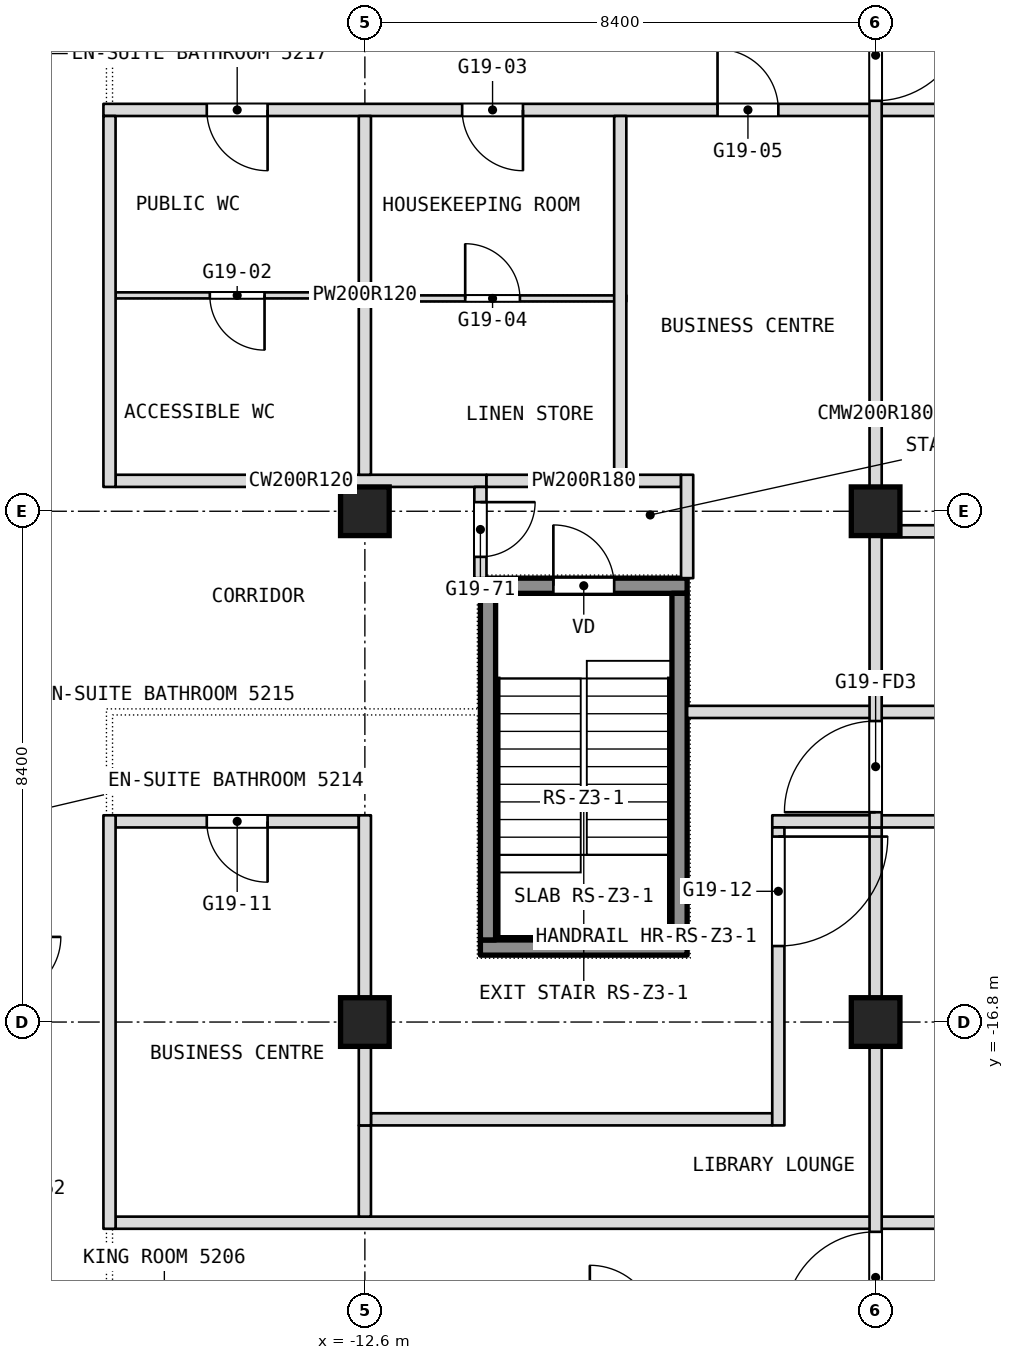
"""IFC4 building model, lengths in metres.
Left out: names, types, materials, properties, quantities, classifications, styles, units other than length and angle.
Written with IfcOpenShell. Run it as: python <this file> out.ifc"""

import sys

from ifc_helpers import new_model, si_unit, direction, frame, frame_2d, origin, origin_2d, place, context, subcontext, project, spatial, rectangle, extrude, element, fill, save


model = new_model("IFC4")
c1 = context("Model", 3, precision=1e-05, world=origin(), true_north=direction((0.0, 1.0)))
c2 = subcontext(c1, "Body", "Model", "MODEL_VIEW")
j1 = project(units=[si_unit("LENGTHUNIT", "METRE"), si_unit("PLANEANGLEUNIT", "RADIAN")], contexts=[c1])
p1 = place(None, origin())
s1 = spatial("IfcSite", under=j1, at=p1, CompositionType="ELEMENT")
p2 = place(p1, origin())
s2 = spatial("IfcBuilding", under=s1, at=p2, CompositionType="ELEMENT")
p3 = place(p2, frame((0.0, 0.0, 223.7)))
s3 = spatial("IfcBuildingStorey", under=s2, at=p3, CompositionType="ELEMENT", Elevation=223.7)
for number, where, z_axis, x_axis in (
    (1, (-12.6, -16.8, 0.0), (0.0, 0.0, 1.0), (1.0, 0.0, 0.0)),
    (2, (-12.6, -8.4, 0.0), (0.0, 0.0, 1.0), (1.0, 0.0, 0.0)),
    (3, (-4.2, -16.8, 0.0), (0.0, 0.0, 1.0), (1.0, 0.0, 0.0)),
    (4, (-4.2, -8.4, 0.0), (0.0, 0.0, 1.0), (1.0, 0.0, 0.0)),
):
    element("IfcColumn", number, at=place(p3, frame(where, z_axis=z_axis, x_axis=x_axis)), inside=s3, PredefinedType="COLUMN", context=c2, shape_type="SweptSolid", body=[
        extrude(rectangle(XDim=0.8, YDim=0.8, at=origin_2d()), origin(), (0.0, 0.0, 1.0), 3.6),
    ])
p4 = place(p3, frame((-16.7, -20.1, 0.0), z_axis=(0.0, 0.0, 1.0), x_axis=(1.0, 0.0, 0.0)))
e5 = element("IfcWall", 5, at=p4, inside=s3, PredefinedType="PARTITIONING", context=c2, shape_type="SweptSolid", body=[
    extrude(rectangle(XDim=33.4, YDim=0.2, at=frame_2d((16.7, 0.0))), origin(), (0.0, 0.0, 1.0), 3.34),
])
p5 = place(p3, frame((-12.5, -18.4, 0.0), z_axis=(0.0, 0.0, 1.0), x_axis=(1.0, 0.0, 0.0)))
e6 = element("IfcWall", 6, at=p5, inside=s3, PredefinedType="PARTITIONING", context=c2, shape_type="SweptSolid", body=[
    extrude(rectangle(XDim=6.6, YDim=0.2, at=frame_2d((3.3, 0.0))), origin(), (0.0, 0.0, 1.0), 3.34),
])
p6 = place(p3, frame((-16.7, -13.5, 0.0), z_axis=(0.0, 0.0, 1.0), x_axis=(1.0, 0.0, 0.0)))
e7 = element("IfcWall", 7, at=p6, inside=s3, PredefinedType="PARTITIONING", context=c2, shape_type="SweptSolid", body=[
    extrude(rectangle(XDim=4.0, YDim=0.2, at=frame_2d((2.0, 0.0))), origin(), (0.0, 0.0, 1.0), 3.34),
])
p7 = place(p6, frame((1.5, 0.0, 0.0)))
e8 = element("IfcOpeningElement", 8, at=p7, cuts=e7, PredefinedType="OPENING", context=c2, shape_type="SweptSolid", body=[
    extrude(rectangle(XDim=1.0, YDim=2.1, at=frame_2d((0.5, 1.05))), frame((0.0, 0.1, 0.0), z_axis=(0.0, -1.0, 0.0), x_axis=(1.0, 0.0, 0.0)), (0.0, 0.0, 1.0), 0.2),
])
p8 = place(p3, frame((-5.9, -13.5, 0.0), z_axis=(0.0, 0.0, 1.0), x_axis=(1.0, 0.0, 0.0)))
e9 = element("IfcWall", 9, at=p8, inside=s3, PredefinedType="PARTITIONING", context=c2, shape_type="SweptSolid", body=[
    extrude(rectangle(XDim=11.6, YDim=0.2, at=frame_2d((5.8, 0.0))), origin(), (0.0, 0.0, 1.0), 3.34),
])
p9 = place(p8, frame((3.3, 0.0, 0.0)))
e10 = element("IfcOpeningElement", 10, at=p9, cuts=e9, PredefinedType="OPENING", context=c2, shape_type="SweptSolid", body=[
    extrude(rectangle(XDim=1.0, YDim=2.1, at=frame_2d((0.5, 1.05))), frame((0.0, 0.1, 0.0), z_axis=(0.0, -1.0, 0.0), x_axis=(1.0, 0.0, 0.0)), (0.0, 0.0, 1.0), 0.2),
])
p10 = place(p8, frame((7.5, 0.0, 0.0)))
e11 = element("IfcOpeningElement", 11, at=p10, cuts=e9, PredefinedType="OPENING", context=c2, shape_type="SweptSolid", body=[
    extrude(rectangle(XDim=1.0, YDim=2.1, at=frame_2d((0.5, 1.05))), frame((0.0, 0.1, 0.0), z_axis=(0.0, -1.0, 0.0), x_axis=(1.0, 0.0, 0.0)), (0.0, 0.0, 1.0), 0.2),
])
p11 = place(p3, frame((-7.3, -11.7, 0.0), z_axis=(0.0, 0.0, 1.0), x_axis=(1.0, 0.0, 0.0)))
e12 = element("IfcWall", 12, at=p11, inside=s3, PredefinedType="PARTITIONING", context=c2, shape_type="SweptSolid", body=[
    extrude(rectangle(XDim=14.6, YDim=0.2, at=frame_2d((7.3, 0.0))), origin(), (0.0, 0.0, 1.0), 3.34),
])
p12 = place(p11, frame((6.8, 0.0, 0.0)))
e13 = element("IfcOpeningElement", 13, at=p12, cuts=e12, PredefinedType="OPENING", context=c2, shape_type="SweptSolid", body=[
    extrude(rectangle(XDim=1.0, YDim=2.1, at=frame_2d((0.5, 1.05))), frame((0.0, 0.1, 0.0), z_axis=(0.0, -1.0, 0.0), x_axis=(1.0, 0.0, 0.0)), (0.0, 0.0, 1.0), 0.2),
])
p13 = place(p3, frame((-4.1, -8.73, 0.0), z_axis=(0.0, 0.0, 1.0), x_axis=(1.0, 0.0, 0.0)))
e14 = element("IfcWall", 14, at=p13, inside=s3, PredefinedType="PARTITIONING", context=c2, shape_type="SweptSolid", body=[
    extrude(rectangle(XDim=8.2, YDim=0.2, at=frame_2d((4.1, 0.0))), origin(), (0.0, 0.0, 1.0), 3.34),
])
p14 = place(p3, frame((-16.7, -7.9, 0.0), z_axis=(0.0, 0.0, 1.0), x_axis=(1.0, 0.0, 0.0)))
e15 = element("IfcWall", 15, at=p14, inside=s3, PredefinedType="PARTITIONING", context=c2, shape_type="SweptSolid", body=[
    extrude(rectangle(XDim=6.1, YDim=0.2, at=frame_2d((3.05, 0.0))), origin(), (0.0, 0.0, 1.0), 3.34),
])
p15 = place(p3, frame((-10.6, -7.9, 0.0), z_axis=(0.0, 0.0, 1.0), x_axis=(1.0, 0.0, 0.0)))
e16 = element("IfcWall", 16, at=p15, inside=s3, PredefinedType="PARTITIONING", context=c2, shape_type="SweptSolid", body=[
    extrude(rectangle(XDim=3.2, YDim=0.2, at=frame_2d((1.6, 0.0))), origin(), (0.0, 0.0, 1.0), 3.34),
])
p16 = place(p3, frame((-12.5, -4.9, 0.0), z_axis=(0.0, 0.0, 1.0), x_axis=(1.0, 0.0, 0.0)))
e17 = element("IfcWall", 17, at=p16, inside=s3, PredefinedType="PARTITIONING", context=c2, shape_type="SweptSolid", body=[
    extrude(rectangle(XDim=4.2, YDim=0.1, at=frame_2d((2.1, 0.0))), origin(), (0.0, 0.0, 1.0), 3.34),
])
p17 = place(p16, frame((1.55, 0.0, 0.0)))
e18 = element("IfcOpeningElement", 18, at=p17, cuts=e17, PredefinedType="OPENING", context=c2, shape_type="SweptSolid", body=[
    extrude(rectangle(XDim=0.9, YDim=2.1, at=frame_2d((0.45, 1.05))), frame((0.0, 0.05, 0.0), z_axis=(0.0, -1.0, 0.0), x_axis=(1.0, 0.0, 0.0)), (0.0, 0.0, 1.0), 0.1),
])
p18 = place(p3, frame((-16.7, -4.85, 0.0), z_axis=(0.0, 0.0, 1.0), x_axis=(1.0, 0.0, 0.0)))
e19 = element("IfcWall", 19, at=p18, inside=s3, PredefinedType="PARTITIONING", context=c2, shape_type="SweptSolid", body=[
    extrude(rectangle(XDim=4.2, YDim=0.1, at=frame_2d((2.1, 0.0))), origin(), (0.0, 0.0, 1.0), 3.34),
])
p19 = place(p18, frame((1.55, 0.0, 0.0)))
e20 = element("IfcOpeningElement", 20, at=p19, cuts=e19, PredefinedType="OPENING", context=c2, shape_type="SweptSolid", body=[
    extrude(rectangle(XDim=0.9, YDim=2.1, at=frame_2d((0.45, 1.05))), frame((0.0, 0.05, 0.0), z_axis=(0.0, -1.0, 0.0), x_axis=(1.0, 0.0, 0.0)), (0.0, 0.0, 1.0), 0.1),
])
p20 = place(p3, frame((-16.9, -1.8, 0.0), z_axis=(0.0, 0.0, 1.0), x_axis=(1.0, 0.0, 0.0)))
e21 = element("IfcWall", 21, at=p20, inside=s3, PredefinedType="PARTITIONING", context=c2, shape_type="SweptSolid", body=[
    extrude(rectangle(XDim=33.8, YDim=0.2, at=frame_2d((16.9, 0.0))), origin(), (0.0, 0.0, 1.0), 3.34),
])
p21 = place(p20, frame((1.7, 0.0, 0.0)))
e22 = element("IfcOpeningElement", 22, at=p21, cuts=e21, PredefinedType="OPENING", context=c2, shape_type="SweptSolid", body=[
    extrude(rectangle(XDim=1.0, YDim=2.1, at=frame_2d((0.5, 1.05))), frame((0.0, 0.1, 0.0), z_axis=(0.0, -1.0, 0.0), x_axis=(1.0, 0.0, 0.0)), (0.0, 0.0, 1.0), 0.2),
])
p22 = place(p20, frame((5.9, 0.0, 0.0)))
e23 = element("IfcOpeningElement", 23, at=p22, cuts=e21, PredefinedType="OPENING", context=c2, shape_type="SweptSolid", body=[
    extrude(rectangle(XDim=1.0, YDim=2.1, at=frame_2d((0.5, 1.05))), frame((0.0, 0.1, 0.0), z_axis=(0.0, -1.0, 0.0), x_axis=(1.0, 0.0, 0.0)), (0.0, 0.0, 1.0), 0.2),
])
p23 = place(p20, frame((10.1, 0.0, 0.0)))
e24 = element("IfcOpeningElement", 24, at=p23, cuts=e21, PredefinedType="OPENING", context=c2, shape_type="SweptSolid", body=[
    extrude(rectangle(XDim=1.0, YDim=2.1, at=frame_2d((0.5, 1.05))), frame((0.0, 0.1, 0.0), z_axis=(0.0, -1.0, 0.0), x_axis=(1.0, 0.0, 0.0)), (0.0, 0.0, 1.0), 0.2),
])
p24 = place(p20, frame((22.7, 0.0, 0.0)))
e25 = element("IfcOpeningElement", 25, at=p24, cuts=e21, PredefinedType="OPENING", context=c2, shape_type="SweptSolid", body=[
    extrude(rectangle(XDim=1.0, YDim=2.1, at=frame_2d((0.5, 1.05))), frame((0.0, 0.1, 0.0), z_axis=(0.0, -1.0, 0.0), x_axis=(1.0, 0.0, 0.0)), (0.0, 0.0, 1.0), 0.2),
])
p25 = place(p20, frame((26.9, 0.0, 0.0)))
e26 = element("IfcOpeningElement", 26, at=p25, cuts=e21, PredefinedType="OPENING", context=c2, shape_type="SweptSolid", body=[
    extrude(rectangle(XDim=1.0, YDim=2.1, at=frame_2d((0.5, 1.05))), frame((0.0, 0.1, 0.0), z_axis=(0.0, -1.0, 0.0), x_axis=(1.0, 0.0, 0.0)), (0.0, 0.0, 1.0), 0.2),
])
p26 = place(p20, frame((31.1, 0.0, 0.0)))
e27 = element("IfcOpeningElement", 27, at=p26, cuts=e21, PredefinedType="OPENING", context=c2, shape_type="SweptSolid", body=[
    extrude(rectangle(XDim=1.0, YDim=2.1, at=frame_2d((0.5, 1.05))), frame((0.0, 0.1, 0.0), z_axis=(0.0, -1.0, 0.0), x_axis=(1.0, 0.0, 0.0)), (0.0, 0.0, 1.0), 0.2),
])
p27 = place(p20, frame((16.4, 0.0, 0.0)))
e28 = element("IfcOpeningElement", 28, at=p27, cuts=e21, PredefinedType="OPENING", context=c2, shape_type="SweptSolid", body=[
    extrude(rectangle(XDim=1.0, YDim=2.1, at=frame_2d((0.5, 1.05))), frame((0.0, 0.1, 0.0), z_axis=(0.0, -1.0, 0.0), x_axis=(1.0, 0.0, 0.0)), (0.0, 0.0, 1.0), 0.2),
])
p28 = place(p3, frame((-4.2, -22.0, 0.0), z_axis=(0.0, 0.0, 1.0), x_axis=(0.0, 1.0, 0.0)))
e29 = element("IfcWall", 29, at=p28, inside=s3, PredefinedType="PARTITIONING", context=c2, shape_type="SweptSolid", body=[
    extrude(rectangle(XDim=8.4, YDim=0.2, at=frame_2d((4.2, 0.0))), origin(), (0.0, 0.0, 1.0), 3.34),
])
p29 = place(p28, frame((0.25, 0.0, 0.0)))
e30 = element("IfcOpeningElement", 30, at=p29, cuts=e29, PredefinedType="OPENING", context=c2, shape_type="SweptSolid", body=[
    extrude(rectangle(XDim=1.5, YDim=2.1, at=frame_2d((0.75, 1.05))), frame((0.0, 0.1, 0.0), z_axis=(0.0, -1.0, 0.0), x_axis=(1.0, 0.0, 0.0)), (0.0, 0.0, 1.0), 0.2),
])
p30 = place(p3, frame((-4.2, -13.6, 0.0), z_axis=(0.0, 0.0, 1.0), x_axis=(0.0, 1.0, 0.0)))
e31 = element("IfcWall", 31, at=p30, inside=s3, PredefinedType="PARTITIONING", context=c2, shape_type="SweptSolid", body=[
    extrude(rectangle(XDim=13.6, YDim=0.2, at=frame_2d((6.8, 0.0))), origin(), (0.0, 0.0, 1.0), 3.34),
])
p31 = place(p30, frame((11.95, 0.0, 0.0)))
e32 = element("IfcOpeningElement", 32, at=p31, cuts=e31, PredefinedType="OPENING", context=c2, shape_type="SweptSolid", body=[
    extrude(rectangle(XDim=1.5, YDim=2.1, at=frame_2d((0.75, 1.05))), frame((0.0, 0.1, 0.0), z_axis=(0.0, -1.0, 0.0), x_axis=(1.0, 0.0, 0.0)), (0.0, 0.0, 1.0), 0.2),
])
p32 = place(p30, frame((0.25, 0.0, 0.0)))
e33 = element("IfcOpeningElement", 33, at=p32, cuts=e31, PredefinedType="OPENING", context=c2, shape_type="SweptSolid", body=[
    extrude(rectangle(XDim=1.5, YDim=2.1, at=frame_2d((0.75, 1.05))), frame((0.0, 0.1, 0.0), z_axis=(0.0, -1.0, 0.0), x_axis=(1.0, 0.0, 0.0)), (0.0, 0.0, 1.0), 0.2),
])
p33 = place(p3, frame((-5.8, -18.5, 0.0), z_axis=(0.0, 0.0, 1.0), x_axis=(0.0, 1.0, 0.0)))
e34 = element("IfcWall", 34, at=p33, inside=s3, PredefinedType="PARTITIONING", context=c2, shape_type="SweptSolid", body=[
    extrude(rectangle(XDim=4.9, YDim=0.2, at=frame_2d((2.45, 0.0))), origin(), (0.0, 0.0, 1.0), 3.34),
])
p34 = place(p33, frame((2.95, 0.0, 0.0)))
e35 = element("IfcOpeningElement", 35, at=p34, cuts=e34, PredefinedType="OPENING", context=c2, shape_type="SweptSolid", body=[
    extrude(rectangle(XDim=1.8, YDim=2.1, at=frame_2d((0.9, 1.05))), frame((0.0, 0.1, 0.0), z_axis=(0.0, -1.0, 0.0), x_axis=(1.0, 0.0, 0.0)), (0.0, 0.0, 1.0), 0.2),
])
p35 = place(p3, frame((-7.3, -9.5, 0.0), z_axis=(0.0, 0.0, 1.0), x_axis=(0.0, 1.0, 0.0)))
e36 = element("IfcWall", 36, at=p35, inside=s3, PredefinedType="PARTITIONING", context=c2, shape_type="SweptSolid", body=[
    extrude(rectangle(XDim=1.7, YDim=0.2, at=frame_2d((0.85, 0.0))), origin(), (0.0, 0.0, 1.0), 3.34),
])
p36 = place(p3, frame((-8.4, -8.0, 0.0), z_axis=(0.0, 0.0, 1.0), x_axis=(0.0, 1.0, 0.0)))
e37 = element("IfcWall", 37, at=p36, inside=s3, PredefinedType="PARTITIONING", context=c2, shape_type="SweptSolid", body=[
    extrude(rectangle(XDim=6.1, YDim=0.2, at=frame_2d((3.05, 0.0))), origin(), (0.0, 0.0, 1.0), 3.34),
])
p37 = place(p3, frame((-10.7, -9.5, 0.0), z_axis=(0.0, 0.0, 1.0), x_axis=(0.0, 1.0, 0.0)))
e38 = element("IfcWall", 38, at=p37, inside=s3, PredefinedType="PARTITIONING", context=c2, shape_type="SweptSolid", body=[
    extrude(rectangle(XDim=1.5, YDim=0.2, at=frame_2d((0.75, 0.0))), origin(), (0.0, 0.0, 1.0), 3.34),
])
p38 = place(p37, frame((0.35, 0.0, 0.0)))
e39 = element("IfcOpeningElement", 39, at=p38, cuts=e38, PredefinedType="OPENING", context=c2, shape_type="SweptSolid", body=[
    extrude(rectangle(XDim=0.9, YDim=2.1, at=frame_2d((0.45, 1.05))), frame((0.0, 0.1, 0.0), z_axis=(0.0, -1.0, 0.0), x_axis=(1.0, 0.0, 0.0)), (0.0, 0.0, 1.0), 0.2),
])
p39 = place(p3, frame((-12.6, -20.0, 0.0), z_axis=(0.0, 0.0, 1.0), x_axis=(0.0, 1.0, 0.0)))
e40 = element("IfcWall", 40, at=p39, inside=s3, PredefinedType="PARTITIONING", context=c2, shape_type="SweptSolid", body=[
    extrude(rectangle(XDim=1.5, YDim=0.2, at=frame_2d((0.75, 0.0))), origin(), (0.0, 0.0, 1.0), 3.34),
])
p40 = place(p3, frame((-12.6, -7.8, 0.0), z_axis=(0.0, 0.0, 1.0), x_axis=(0.0, 1.0, 0.0)))
e41 = element("IfcWall", 41, at=p40, inside=s3, PredefinedType="PARTITIONING", context=c2, shape_type="SweptSolid", body=[
    extrude(rectangle(XDim=5.9, YDim=0.2, at=frame_2d((2.95, 0.0))), origin(), (0.0, 0.0, 1.0), 3.34),
])
p41 = place(p3, frame((-12.6, -18.5, 0.0), z_axis=(0.0, 0.0, 1.0), x_axis=(0.0, 1.0, 0.0)))
e42 = element("IfcWall", 42, at=p41, inside=s3, PredefinedType="PARTITIONING", context=c2, shape_type="SweptSolid", body=[
    extrude(rectangle(XDim=5.1, YDim=0.2, at=frame_2d((2.55, 0.0))), origin(), (0.0, 0.0, 1.0), 3.34),
])
p42 = place(p3, frame((-16.8, -20.2, 0.0), z_axis=(0.0, 0.0, 1.0), x_axis=(0.0, 1.0, 0.0)))
e43 = element("IfcWall", 43, at=p42, inside=s3, PredefinedType="PARTITIONING", context=c2, shape_type="SweptSolid", body=[
    extrude(rectangle(XDim=6.8, YDim=0.2, at=frame_2d((3.4, 0.0))), origin(), (0.0, 0.0, 1.0), 3.34),
])
p43 = place(p3, frame((-16.8, -8.0, 0.0), z_axis=(0.0, 0.0, 1.0), x_axis=(0.0, 1.0, 0.0)))
e44 = element("IfcWall", 44, at=p43, inside=s3, PredefinedType="PARTITIONING", context=c2, shape_type="SweptSolid", body=[
    extrude(rectangle(XDim=6.1, YDim=0.2, at=frame_2d((3.05, 0.0))), origin(), (0.0, 0.0, 1.0), 3.34),
])
p44 = place(p3, frame((-10.7, -15.575, 0.1), z_axis=(0.0, 0.0, 1.0), x_axis=(1.0, 0.0, 0.0)))
e45 = element("IfcWall", 45, at=p44, inside=s3, PredefinedType="SHEAR", context=c2, shape_type="SweptSolid", body=[
    extrude(rectangle(XDim=3.4, YDim=0.25, at=frame_2d((1.7, 0.0))), origin(), (0.0, 0.0, 1.0), 3.6),
])
p45 = place(p3, frame((-10.7, -9.625, 0.1), z_axis=(0.0, 0.0, 1.0), x_axis=(1.0, 0.0, 0.0)))
e46 = element("IfcWall", 46, at=p45, inside=s3, PredefinedType="SHEAR", context=c2, shape_type="SweptSolid", body=[
    extrude(rectangle(XDim=3.4, YDim=0.25, at=frame_2d((1.7, 0.0))), origin(), (0.0, 0.0, 1.0), 3.6),
])
p46 = place(p45, frame((1.2, 0.0, 0.0)))
e47 = element("IfcOpeningElement", 47, at=p46, cuts=e46, PredefinedType="OPENING", context=c2, shape_type="SweptSolid", body=[
    extrude(rectangle(XDim=1.0, YDim=2.1, at=frame_2d((0.5, 1.05))), frame((0.0, 0.125, 0.0), z_axis=(0.0, -1.0, 0.0), x_axis=(1.0, 0.0, 0.0)), (0.0, 0.0, 1.0), 0.25),
])
for number, where, z_axis, x_axis in (
    (48, (-10.575, -15.45, 0.1), (0.0, 0.0, 1.0), (0.0, 1.0, 0.0)),
    (49, (-7.425, -15.45, 0.1), (0.0, 0.0, 1.0), (0.0, 1.0, 0.0)),
):
    element("IfcWall", number, at=place(p3, frame(where, z_axis=z_axis, x_axis=x_axis)), inside=s3, PredefinedType="SHEAR", context=c2, shape_type="SweptSolid", body=[
        extrude(rectangle(XDim=5.7, YDim=0.25, at=frame_2d((2.85, 0.0))), origin(), (0.0, 0.0, 1.0), 3.6),
    ])
p47 = place(p7, origin())
e50 = element("IfcDoor", 50, at=p47, inside=s3, OperationType="SINGLE_SWING_LEFT", PredefinedType="DOOR", context=c2, shape_type="SweptSolid", body=[
    extrude(rectangle(XDim=1.0, YDim=2.1, at=frame_2d((0.5, 1.05))), frame((0.0, 0.025, 0.0), z_axis=(0.0, -1.0, 0.0), x_axis=(1.0, 0.0, 0.0)), (0.0, 0.0, 1.0), 0.05),
])
fill(e8, e50)
p48 = place(p17, origin())
e51 = element("IfcDoor", 51, at=p48, inside=s3, OperationType="SINGLE_SWING_RIGHT", PredefinedType="DOOR", context=c2, shape_type="SweptSolid", body=[
    extrude(rectangle(XDim=0.9, YDim=2.1, at=frame_2d((0.45, 1.05))), frame((0.0, 0.025, 0.0), z_axis=(0.0, -1.0, 0.0), x_axis=(1.0, 0.0, 0.0)), (0.0, 0.0, 1.0), 0.05),
])
fill(e18, e51)
p49 = place(p19, origin())
e52 = element("IfcDoor", 52, at=p49, inside=s3, OperationType="SINGLE_SWING_RIGHT", PredefinedType="DOOR", context=c2, shape_type="SweptSolid", body=[
    extrude(rectangle(XDim=0.9, YDim=2.1, at=frame_2d((0.45, 1.05))), frame((0.0, 0.025, 0.0), z_axis=(0.0, -1.0, 0.0), x_axis=(1.0, 0.0, 0.0)), (0.0, 0.0, 1.0), 0.05),
])
fill(e20, e52)
p50 = place(p21, origin())
e53 = element("IfcDoor", 53, at=p50, inside=s3, OperationType="SINGLE_SWING_LEFT", PredefinedType="DOOR", context=c2, shape_type="SweptSolid", body=[
    extrude(rectangle(XDim=1.0, YDim=2.1, at=frame_2d((0.5, 1.05))), frame((0.0, 0.025, 0.0), z_axis=(0.0, -1.0, 0.0), x_axis=(1.0, 0.0, 0.0)), (0.0, 0.0, 1.0), 0.05),
])
fill(e22, e53)
p51 = place(p22, origin())
e54 = element("IfcDoor", 54, at=p51, inside=s3, OperationType="SINGLE_SWING_LEFT", PredefinedType="DOOR", context=c2, shape_type="SweptSolid", body=[
    extrude(rectangle(XDim=1.0, YDim=2.1, at=frame_2d((0.5, 1.05))), frame((0.0, 0.025, 0.0), z_axis=(0.0, -1.0, 0.0), x_axis=(1.0, 0.0, 0.0)), (0.0, 0.0, 1.0), 0.05),
])
fill(e23, e54)
p52 = place(p23, origin())
e55 = element("IfcDoor", 55, at=p52, inside=s3, OperationType="SINGLE_SWING_RIGHT", PredefinedType="DOOR", context=c2, shape_type="SweptSolid", body=[
    extrude(rectangle(XDim=1.0, YDim=2.1, at=frame_2d((0.5, 1.05))), frame((0.0, 0.025, 0.0), z_axis=(0.0, -1.0, 0.0), x_axis=(1.0, 0.0, 0.0)), (0.0, 0.0, 1.0), 0.05),
])
fill(e24, e55)
p53 = place(p34, origin())
e56 = element("IfcDoor", 56, at=p53, inside=s3, OperationType="DOUBLE_DOOR_SINGLE_SWING", PredefinedType="DOOR", context=c2, shape_type="SweptSolid", body=[
    extrude(rectangle(XDim=1.8, YDim=2.1, at=frame_2d((0.9, 1.05))), frame((0.0, 0.025, 0.0), z_axis=(0.0, -1.0, 0.0), x_axis=(1.0, 0.0, 0.0)), (0.0, 0.0, 1.0), 0.05),
])
fill(e35, e56)
p54 = place(p38, origin())
e57 = element("IfcDoor", 57, at=p54, inside=s3, OperationType="SINGLE_SWING_LEFT", PredefinedType="DOOR", context=c2, shape_type="SweptSolid", body=[
    extrude(rectangle(XDim=0.9, YDim=2.1, at=frame_2d((0.45, 1.05))), frame((0.0, 0.025, 0.0), z_axis=(0.0, -1.0, 0.0), x_axis=(1.0, 0.0, 0.0)), (0.0, 0.0, 1.0), 0.05),
])
fill(e39, e57)
p55 = place(p46, origin())
e58 = element("IfcDoor", 58, at=p55, inside=s3, OperationType="SINGLE_SWING_LEFT", PredefinedType="DOOR", context=c2, shape_type="SweptSolid", body=[
    extrude(rectangle(XDim=1.0, YDim=2.1, at=frame_2d((0.5, 1.05))), frame((0.0, 0.025, 0.0), z_axis=(0.0, -1.0, 0.0), x_axis=(1.0, 0.0, 0.0)), (0.0, 0.0, 1.0), 0.05),
])
fill(e47, e58)
p56 = place(p31, origin())
e59 = element("IfcDoor", 59, at=p56, inside=s3, OperationType="DOUBLE_DOOR_DOUBLE_SWING", PredefinedType="DOOR", context=c2, shape_type="SweptSolid", body=[
    extrude(rectangle(XDim=1.5, YDim=2.1, at=frame_2d((0.75, 1.05))), frame((0.0, 0.025, 0.0), z_axis=(0.0, -1.0, 0.0), x_axis=(1.0, 0.0, 0.0)), (0.0, 0.0, 1.0), 0.05),
])
fill(e32, e59)
p57 = place(p32, origin())
e60 = element("IfcDoor", 60, at=p57, inside=s3, OperationType="DOUBLE_DOOR_DOUBLE_SWING", PredefinedType="DOOR", context=c2, shape_type="SweptSolid", body=[
    extrude(rectangle(XDim=1.5, YDim=2.1, at=frame_2d((0.75, 1.05))), frame((0.0, 0.025, 0.0), z_axis=(0.0, -1.0, 0.0), x_axis=(1.0, 0.0, 0.0)), (0.0, 0.0, 1.0), 0.05),
])
fill(e33, e60)
p58 = place(p29, origin())
e61 = element("IfcDoor", 61, at=p58, inside=s3, OperationType="DOUBLE_DOOR_DOUBLE_SWING", PredefinedType="DOOR", context=c2, shape_type="SweptSolid", body=[
    extrude(rectangle(XDim=1.5, YDim=2.1, at=frame_2d((0.75, 1.05))), frame((0.0, 0.025, 0.0), z_axis=(0.0, -1.0, 0.0), x_axis=(1.0, 0.0, 0.0)), (0.0, 0.0, 1.0), 0.05),
])
fill(e30, e61)
save(model, sys.argv[1])
